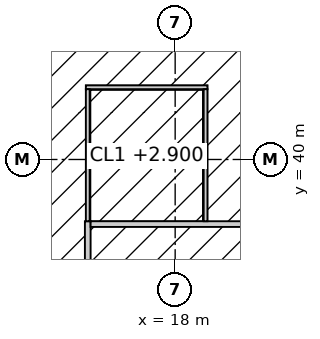
"""IFC4 building model, lengths in metres.
Left out: names, types, materials, properties, quantities, classifications, styles, units other than length and angle.
Written with IfcOpenShell. Run it as: python <this file> out.ifc"""

import sys

from ifc_helpers import new_model, si_unit, direction, frame, frame_2d, origin, place, context, subcontext, project, spatial, rectangle, extrude, element, fill, save


model = new_model("IFC4")
c1 = context("Model", 3, precision=1e-05, world=origin(), true_north=direction((0.0, 1.0)))
c2 = subcontext(c1, "Body", "Model", "MODEL_VIEW")
j1 = project(units=[si_unit("LENGTHUNIT", "METRE"), si_unit("PLANEANGLEUNIT", "RADIAN")], contexts=[c1])
p1 = place(None, origin())
s1 = spatial("IfcSite", under=j1, at=p1, CompositionType="ELEMENT")
p2 = place(p1, origin())
s2 = spatial("IfcBuilding", under=s1, at=p2, CompositionType="ELEMENT")
p3 = place(p2, frame((0.0, 0.0, 81.4)))
s3 = spatial("IfcBuildingStorey", under=s2, at=p3, CompositionType="ELEMENT", Elevation=81.4)
p4 = place(p3, frame((15.7, 15.025, 0.0), z_axis=(0.0, 0.0, 1.0), x_axis=(0.0, 1.0, 0.0)))
e1 = element("IfcWall", 1, at=p4, inside=s3, PredefinedType="PARTITIONING", context=c2, shape_type="SweptSolid", body=[
    extrude(rectangle(XDim=23.35, YDim=0.15, at=frame_2d((11.675, 0.0))), origin(), (0.0, 0.0, 1.0), 3.85),
])
p5 = place(p4, frame((10.775, 0.0, 0.0)))
e2 = element("IfcOpeningElement", 2, at=p5, cuts=e1, PredefinedType="OPENING", context=c2, shape_type="SweptSolid", body=[
    extrude(rectangle(XDim=1.8, YDim=2.4, at=frame_2d((0.9, 1.2))), frame((0.0, 0.085, 0.0), z_axis=(0.0, -1.0, 0.0), x_axis=(1.0, 0.0, 0.0)), (0.0, 0.0, 1.0), 0.17),
])
p6 = place(p3, frame((15.775, 38.3, 0.0), z_axis=(0.0, 0.0, 1.0), x_axis=(1.0, 0.0, 0.0)))
e3 = element("IfcWall", 3, at=p6, inside=s3, PredefinedType="PARTITIONING", context=c2, shape_type="SweptSolid", body=[
    extrude(rectangle(XDim=22.05, YDim=0.15, at=frame_2d((11.025, 0.0))), origin(), (0.0, 0.0, 1.0), 3.85),
])
p7 = place(p6, frame((7.975, 0.0, 0.0)))
e4 = element("IfcOpeningElement", 4, at=p7, cuts=e3, PredefinedType="OPENING", context=c2, shape_type="SweptSolid", body=[
    extrude(rectangle(XDim=0.9, YDim=2.1, at=frame_2d((0.45, 1.05))), frame((0.0, 0.085, 0.0), z_axis=(0.0, -1.0, 0.0), x_axis=(1.0, 0.0, 0.0)), (0.0, 0.0, 1.0), 0.17),
])
p8 = place(p6, frame((11.725, 0.0, 0.0)))
e5 = element("IfcOpeningElement", 5, at=p8, cuts=e3, PredefinedType="OPENING", context=c2, shape_type="SweptSolid", body=[
    extrude(rectangle(XDim=1.0, YDim=2.1, at=frame_2d((0.5, 1.05))), frame((0.0, 0.085, 0.0), z_axis=(0.0, -1.0, 0.0), x_axis=(1.0, 0.0, 0.0)), (0.0, 0.0, 1.0), 0.17),
])
p9 = place(p6, frame((15.575, 0.0, 0.0)))
e6 = element("IfcOpeningElement", 6, at=p9, cuts=e3, PredefinedType="OPENING", context=c2, shape_type="SweptSolid", body=[
    extrude(rectangle(XDim=0.9, YDim=2.1, at=frame_2d((0.45, 1.05))), frame((0.0, 0.085, 0.0), z_axis=(0.0, -1.0, 0.0), x_axis=(1.0, 0.0, 0.0)), (0.0, 0.0, 1.0), 0.17),
])
p10 = place(p3, frame((15.65, 41.9, 0.0), z_axis=(0.0, 0.0, 1.0), x_axis=(1.0, 0.0, 0.0)))
e7 = element("IfcWall", 7, at=p10, inside=s3, PredefinedType="PARTITIONING", context=c2, shape_type="SweptSolid", body=[
    extrude(rectangle(XDim=3.2, YDim=0.1, at=frame_2d((1.6, 0.0))), origin(), (0.0, 0.0, 1.0), 3.85),
])
p11 = place(p10, frame((1.1, 0.0, 0.0)))
e8 = element("IfcOpeningElement", 8, at=p11, cuts=e7, PredefinedType="OPENING", context=c2, shape_type="SweptSolid", body=[
    extrude(rectangle(XDim=1.0, YDim=2.2, at=frame_2d((0.5, 1.1))), frame((0.0, 0.06, 0.0), z_axis=(0.0, -1.0, 0.0), x_axis=(1.0, 0.0, 0.0)), (0.0, 0.0, 1.0), 0.12),
])
for number, where, z_axis, x_axis in (
    (9, (15.7, 38.375, 0.0), (0.0, 0.0, 1.0), (0.0, 1.0, 0.0)),
    (10, (18.8, 38.375, 0.0), (0.0, 0.0, 1.0), (0.0, 1.0, 0.0)),
):
    element("IfcWall", number, at=place(p3, frame(where, z_axis=z_axis, x_axis=x_axis)), inside=s3, PredefinedType="PARTITIONING", context=c2, shape_type="SweptSolid", body=[
        extrude(rectangle(XDim=3.475, YDim=0.1, at=frame_2d((1.738, 0.0))), origin(), (0.0, 0.0, 1.0), 3.85),
    ])
p12 = place(p11, origin())
e11 = element("IfcDoor", 11, at=p12, inside=s3, OperationType="SINGLE_SWING_LEFT", PredefinedType="DOOR", context=c2, shape_type="SweptSolid", body=[
    extrude(rectangle(XDim=1.0, YDim=2.2, at=frame_2d((0.5, 1.1))), frame((0.0, 0.025, 0.0), z_axis=(0.0, -1.0, 0.0), x_axis=(1.0, 0.0, 0.0)), (0.0, 0.0, 1.0), 0.05),
])
fill(e8, e11)
save(model, sys.argv[1])
